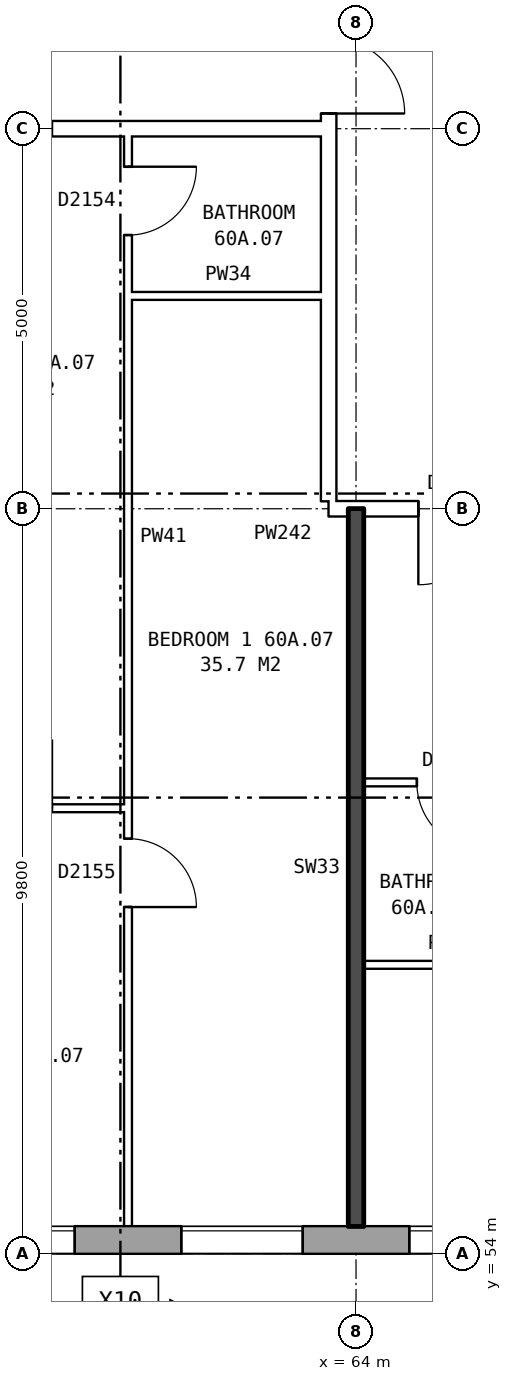
"""IFC4 building model, lengths in metres.
Left out: names, types, materials, properties, quantities, classifications, styles, units other than length and angle.
Written with IfcOpenShell. Run it as: python <this file> out.ifc"""

import sys

from ifc_helpers import new_model, si_unit, direction, frame, frame_2d, origin, place, context, subcontext, project, spatial, rectangle, extrude, element, fill, save


model = new_model("IFC4")
c1 = context("Model", 3, precision=1e-05, world=origin(), true_north=direction((0.0, 1.0)))
c2 = subcontext(c1, "Body", "Model", "MODEL_VIEW")
j1 = project(units=[si_unit("LENGTHUNIT", "METRE"), si_unit("PLANEANGLEUNIT", "RADIAN")], contexts=[c1])
p1 = place(None, origin())
s1 = spatial("IfcSite", under=j1, at=p1, CompositionType="ELEMENT")
p2 = place(p1, origin())
s2 = spatial("IfcBuilding", under=s1, at=p2, CompositionType="ELEMENT")
p3 = place(p2, frame((0.0, 0.0, 212.1)))
s3 = spatial("IfcBuildingStorey", under=s2, at=p3, CompositionType="ELEMENT", Elevation=212.1)
p4 = place(p3, frame((35.075, 54.18, 0.0), z_axis=(0.0, 0.0, 1.0), x_axis=(1.0, 0.0, 0.0)))
e1 = element("IfcWall", 1, at=p4, inside=s3, PredefinedType="STANDARD", context=c2, shape_type="SweptSolid", body=[
    extrude(rectangle(XDim=39.875, YDim=0.36, at=frame_2d((19.938, 0.0))), origin(), (0.0, 0.0, 1.0), 2.85),
])
p5 = place(p4, frame((0.3, 0.0, 0.8)))
e2 = element("IfcOpeningElement", 2, at=p5, cuts=e1, PredefinedType="OPENING", context=c2, shape_type="SweptSolid", body=[
    extrude(rectangle(XDim=0.8, YDim=1.5, at=frame_2d((0.4, 0.75))), frame((0.0, 0.19, 0.0), z_axis=(0.0, -1.0, 0.0), x_axis=(1.0, 0.0, 0.0)), (0.0, 0.0, 1.0), 0.38),
])
p6 = place(p4, frame((5.625, 0.0, 0.8)))
e3 = element("IfcOpeningElement", 3, at=p6, cuts=e1, PredefinedType="OPENING", context=c2, shape_type="SweptSolid", body=[
    extrude(rectangle(XDim=1.6, YDim=1.8, at=frame_2d((0.8, 0.9))), frame((0.0, 0.19, 0.0), z_axis=(0.0, -1.0, 0.0), x_axis=(1.0, 0.0, 0.0)), (0.0, 0.0, 1.0), 0.38),
])
p7 = place(p4, frame((8.625, 0.0, 0.8)))
e4 = element("IfcOpeningElement", 4, at=p7, cuts=e1, PredefinedType="OPENING", context=c2, shape_type="SweptSolid", body=[
    extrude(rectangle(XDim=1.6, YDim=1.8, at=frame_2d((0.8, 0.9))), frame((0.0, 0.19, 0.0), z_axis=(0.0, -1.0, 0.0), x_axis=(1.0, 0.0, 0.0)), (0.0, 0.0, 1.0), 0.38),
])
p8 = place(p4, frame((11.625, 0.0, 0.8)))
e5 = element("IfcOpeningElement", 5, at=p8, cuts=e1, PredefinedType="OPENING", context=c2, shape_type="SweptSolid", body=[
    extrude(rectangle(XDim=1.6, YDim=1.8, at=frame_2d((0.8, 0.9))), frame((0.0, 0.19, 0.0), z_axis=(0.0, -1.0, 0.0), x_axis=(1.0, 0.0, 0.0)), (0.0, 0.0, 1.0), 0.38),
])
p9 = place(p4, frame((14.625, 0.0, 0.8)))
e6 = element("IfcOpeningElement", 6, at=p9, cuts=e1, PredefinedType="OPENING", context=c2, shape_type="SweptSolid", body=[
    extrude(rectangle(XDim=1.6, YDim=1.8, at=frame_2d((0.8, 0.9))), frame((0.0, 0.19, 0.0), z_axis=(0.0, -1.0, 0.0), x_axis=(1.0, 0.0, 0.0)), (0.0, 0.0, 1.0), 0.38),
])
p10 = place(p4, frame((17.625, 0.0, 0.8)))
e7 = element("IfcOpeningElement", 7, at=p10, cuts=e1, PredefinedType="OPENING", context=c2, shape_type="SweptSolid", body=[
    extrude(rectangle(XDim=1.6, YDim=1.8, at=frame_2d((0.8, 0.9))), frame((0.0, 0.19, 0.0), z_axis=(0.0, -1.0, 0.0), x_axis=(1.0, 0.0, 0.0)), (0.0, 0.0, 1.0), 0.38),
])
p11 = place(p4, frame((20.625, 0.0, 0.8)))
e8 = element("IfcOpeningElement", 8, at=p11, cuts=e1, PredefinedType="OPENING", context=c2, shape_type="SweptSolid", body=[
    extrude(rectangle(XDim=1.6, YDim=1.8, at=frame_2d((0.8, 0.9))), frame((0.0, 0.19, 0.0), z_axis=(0.0, -1.0, 0.0), x_axis=(1.0, 0.0, 0.0)), (0.0, 0.0, 1.0), 0.38),
])
p12 = place(p4, frame((23.625, 0.0, 0.8)))
e9 = element("IfcOpeningElement", 9, at=p12, cuts=e1, PredefinedType="OPENING", context=c2, shape_type="SweptSolid", body=[
    extrude(rectangle(XDim=1.6, YDim=1.8, at=frame_2d((0.8, 0.9))), frame((0.0, 0.19, 0.0), z_axis=(0.0, -1.0, 0.0), x_axis=(1.0, 0.0, 0.0)), (0.0, 0.0, 1.0), 0.38),
])
p13 = place(p4, frame((26.625, 0.0, 0.8)))
e10 = element("IfcOpeningElement", 10, at=p13, cuts=e1, PredefinedType="OPENING", context=c2, shape_type="SweptSolid", body=[
    extrude(rectangle(XDim=1.6, YDim=1.8, at=frame_2d((0.8, 0.9))), frame((0.0, 0.19, 0.0), z_axis=(0.0, -1.0, 0.0), x_axis=(1.0, 0.0, 0.0)), (0.0, 0.0, 1.0), 0.38),
])
p14 = place(p4, frame((29.625, 0.0, 0.8)))
e11 = element("IfcOpeningElement", 11, at=p14, cuts=e1, PredefinedType="OPENING", context=c2, shape_type="SweptSolid", body=[
    extrude(rectangle(XDim=1.6, YDim=1.8, at=frame_2d((0.8, 0.9))), frame((0.0, 0.19, 0.0), z_axis=(0.0, -1.0, 0.0), x_axis=(1.0, 0.0, 0.0)), (0.0, 0.0, 1.0), 0.38),
])
p15 = place(p4, frame((31.525, 0.0, 0.8)))
e12 = element("IfcOpeningElement", 12, at=p15, cuts=e1, PredefinedType="OPENING", context=c2, shape_type="SweptSolid", body=[
    extrude(rectangle(XDim=0.8, YDim=1.5, at=frame_2d((0.4, 0.75))), frame((0.0, 0.19, 0.0), z_axis=(0.0, -1.0, 0.0), x_axis=(1.0, 0.0, 0.0)), (0.0, 0.0, 1.0), 0.38),
])
p16 = place(p4, frame((35.625, 0.0, 0.8)))
e13 = element("IfcOpeningElement", 13, at=p16, cuts=e1, PredefinedType="OPENING", context=c2, shape_type="SweptSolid", body=[
    extrude(rectangle(XDim=1.6, YDim=1.8, at=frame_2d((0.8, 0.9))), frame((0.0, 0.19, 0.0), z_axis=(0.0, -1.0, 0.0), x_axis=(1.0, 0.0, 0.0)), (0.0, 0.0, 1.0), 0.38),
])
p17 = place(p4, frame((1.4, 0.0, 0.8)))
e14 = element("IfcOpeningElement", 14, at=p17, cuts=e1, PredefinedType="OPENING", context=c2, shape_type="SweptSolid", body=[
    extrude(rectangle(XDim=1.4, YDim=1.8, at=frame_2d((0.7, 0.9))), frame((0.0, 0.19, 0.0), z_axis=(0.0, -1.0, 0.0), x_axis=(1.0, 0.0, 0.0)), (0.0, 0.0, 1.0), 0.38),
])
p18 = place(p4, frame((33.975, 0.0, 1.7)))
e15 = element("IfcOpeningElement", 15, at=p18, cuts=e1, PredefinedType="OPENING", context=c2, shape_type="SweptSolid", body=[
    extrude(rectangle(XDim=0.6, YDim=0.9, at=frame_2d((0.3, 0.45))), frame((0.0, 0.19, 0.0), z_axis=(0.0, -1.0, 0.0), x_axis=(1.0, 0.0, 0.0)), (0.0, 0.0, 1.0), 0.38),
])
p19 = place(p3, frame((63.64, 63.9, 0.0), z_axis=(0.0, 0.0, 1.0), x_axis=(0.0, 1.0, 0.0)))
e16 = element("IfcWall", 16, at=p19, inside=s3, PredefinedType="PARTITIONING", context=c2, shape_type="SweptSolid", body=[
    extrude(rectangle(XDim=12.2, YDim=0.2, at=frame_2d((6.1, 0.0))), origin(), (0.0, 0.0, 1.0), 2.85),
])
p20 = place(p19, frame((5.1, 0.0, 0.0)))
e17 = element("IfcOpeningElement", 17, at=p20, cuts=e16, PredefinedType="OPENING", context=c2, shape_type="SweptSolid", body=[
    extrude(rectangle(XDim=2.0, YDim=2.1, at=frame_2d((1.0, 1.05))), frame((0.0, 0.11, 0.0), z_axis=(0.0, -1.0, 0.0), x_axis=(1.0, 0.0, 0.0)), (0.0, 0.0, 1.0), 0.22),
])
p21 = place(p3, frame((64.1, 57.8, 0.0), z_axis=(0.0, 0.0, 1.0), x_axis=(1.0, 0.0, 0.0)))
e18 = element("IfcWall", 18, at=p21, inside=s3, PredefinedType="PARTITIONING", context=c2, shape_type="SweptSolid", body=[
    extrude(rectangle(XDim=2.3, YDim=0.1, at=frame_2d((1.15, 0.0))), origin(), (0.0, 0.0, 1.0), 2.85),
])
p22 = place(p3, frame((58.1, 59.86, 0.0), z_axis=(0.0, 0.0, 1.0), x_axis=(1.0, 0.0, 0.0)))
e19 = element("IfcWall", 19, at=p22, inside=s3, PredefinedType="PARTITIONING", context=c2, shape_type="SweptSolid", body=[
    extrude(rectangle(XDim=2.9, YDim=0.1, at=frame_2d((1.45, 0.0))), origin(), (0.0, 0.0, 1.0), 2.85),
])
p23 = place(p22, frame((1.0, 0.0, 0.0)))
e20 = element("IfcOpeningElement", 20, at=p23, cuts=e19, PredefinedType="OPENING", context=c2, shape_type="SweptSolid", body=[
    extrude(rectangle(XDim=0.9, YDim=2.1, at=frame_2d((0.45, 1.05))), frame((0.0, 0.06, 0.0), z_axis=(0.0, -1.0, 0.0), x_axis=(1.0, 0.0, 0.0)), (0.0, 0.0, 1.0), 0.12),
])
p24 = place(p3, frame((64.1, 60.2, 0.0), z_axis=(0.0, 0.0, 1.0), x_axis=(1.0, 0.0, 0.0)))
e21 = element("IfcWall", 21, at=p24, inside=s3, PredefinedType="PARTITIONING", context=c2, shape_type="SweptSolid", body=[
    extrude(rectangle(XDim=5.8, YDim=0.1, at=frame_2d((2.9, 0.0))), origin(), (0.0, 0.0, 1.0), 2.85),
])
p25 = place(p24, frame((3.6, 0.0, 0.0)))
e22 = element("IfcOpeningElement", 22, at=p25, cuts=e21, PredefinedType="OPENING", context=c2, shape_type="SweptSolid", body=[
    extrude(rectangle(XDim=0.9, YDim=2.1, at=frame_2d((0.45, 1.05))), frame((0.0, 0.06, 0.0), z_axis=(0.0, -1.0, 0.0), x_axis=(1.0, 0.0, 0.0)), (0.0, 0.0, 1.0), 0.12),
])
p26 = place(p24, frame((0.7, 0.0, 0.0)))
e23 = element("IfcOpeningElement", 23, at=p26, cuts=e21, PredefinedType="OPENING", context=c2, shape_type="SweptSolid", body=[
    extrude(rectangle(XDim=0.9, YDim=2.1, at=frame_2d((0.45, 1.05))), frame((0.0, 0.06, 0.0), z_axis=(0.0, -1.0, 0.0), x_axis=(1.0, 0.0, 0.0)), (0.0, 0.0, 1.0), 0.12),
])
p27 = place(p3, frame((63.64, 63.8, 0.0), z_axis=(0.0, 0.0, 1.0), x_axis=(1.0, 0.0, 0.0)))
e24 = element("IfcWall", 24, at=p27, inside=s3, PredefinedType="PARTITIONING", context=c2, shape_type="SweptSolid", body=[
    extrude(rectangle(XDim=3.0, YDim=0.2, at=frame_2d((1.5, 0.0))), origin(), (0.0, 0.0, 1.0), 2.85),
])
p28 = place(p27, frame((1.18, 0.0, 0.0)))
e25 = element("IfcOpeningElement", 25, at=p28, cuts=e24, PredefinedType="OPENING", context=c2, shape_type="SweptSolid", body=[
    extrude(rectangle(XDim=1.0, YDim=2.1, at=frame_2d((0.5, 1.05))), frame((0.0, 0.11, 0.0), z_axis=(0.0, -1.0, 0.0), x_axis=(1.0, 0.0, 0.0)), (0.0, 0.0, 1.0), 0.22),
])
p29 = place(p3, frame((61.0, 66.6, 0.0), z_axis=(0.0, 0.0, 1.0), x_axis=(1.0, 0.0, 0.0)))
e26 = element("IfcWall", 26, at=p29, inside=s3, PredefinedType="PARTITIONING", context=c2, shape_type="SweptSolid", body=[
    extrude(rectangle(XDim=2.64, YDim=0.1, at=frame_2d((1.32, 0.0))), origin(), (0.0, 0.0, 1.0), 2.85),
])
p30 = place(p3, frame((44.36, 68.8, 0.0), z_axis=(0.0, 0.0, 1.0), x_axis=(1.0, 0.0, 0.0)))
e27 = element("IfcWall", 27, at=p30, inside=s3, PredefinedType="PARTITIONING", context=c2, shape_type="SweptSolid", body=[
    extrude(rectangle(XDim=19.28, YDim=0.2, at=frame_2d((9.64, 0.0))), origin(), (0.0, 0.0, 1.0), 2.85),
])
p31 = place(p30, frame((14.64, 0.0, 0.0)))
e28 = element("IfcOpeningElement", 28, at=p31, cuts=e27, PredefinedType="OPENING", context=c2, shape_type="SweptSolid", body=[
    extrude(rectangle(XDim=1.0, YDim=2.1, at=frame_2d((0.5, 1.05))), frame((0.0, 0.11, 0.0), z_axis=(0.0, -1.0, 0.0), x_axis=(1.0, 0.0, 0.0)), (0.0, 0.0, 1.0), 0.22),
])
p32 = place(p30, frame((5.64, 0.0, 0.0)))
e29 = element("IfcOpeningElement", 29, at=p32, cuts=e27, PredefinedType="OPENING", context=c2, shape_type="SweptSolid", body=[
    extrude(rectangle(XDim=1.0, YDim=2.1, at=frame_2d((0.5, 1.05))), frame((0.0, 0.11, 0.0), z_axis=(0.0, -1.0, 0.0), x_axis=(1.0, 0.0, 0.0)), (0.0, 0.0, 1.0), 0.22),
])
p33 = place(p3, frame((61.0, 54.36, 0.0), z_axis=(0.0, 0.0, 1.0), x_axis=(0.0, 1.0, 0.0)))
e30 = element("IfcWall", 30, at=p33, inside=s3, PredefinedType="PARTITIONING", context=c2, shape_type="SweptSolid", body=[
    extrude(rectangle(XDim=14.34, YDim=0.1, at=frame_2d((7.17, 0.0))), origin(), (0.0, 0.0, 1.0), 2.85),
])
p34 = place(p33, frame((4.2, 0.0, 0.0)))
e31 = element("IfcOpeningElement", 31, at=p34, cuts=e30, PredefinedType="OPENING", context=c2, shape_type="SweptSolid", body=[
    extrude(rectangle(XDim=0.9, YDim=2.1, at=frame_2d((0.45, 1.05))), frame((0.0, 0.06, 0.0), z_axis=(0.0, -1.0, 0.0), x_axis=(1.0, 0.0, 0.0)), (0.0, 0.0, 1.0), 0.12),
])
p35 = place(p33, frame((13.04, 0.0, 0.0)))
e32 = element("IfcOpeningElement", 32, at=p35, cuts=e30, PredefinedType="OPENING", context=c2, shape_type="SweptSolid", body=[
    extrude(rectangle(XDim=0.9, YDim=2.1, at=frame_2d((0.45, 1.05))), frame((0.0, 0.06, 0.0), z_axis=(0.0, -1.0, 0.0), x_axis=(1.0, 0.0, 0.0)), (0.0, 0.0, 1.0), 0.12),
])
p36 = place(p3, frame((64.0, 54.36, 0.0), z_axis=(0.0, 0.0, 1.0), x_axis=(0.0, 1.0, 0.0)))
e33 = element("IfcWall", 33, at=p36, inside=s3, PredefinedType="SOLIDWALL", context=c2, shape_type="SweptSolid", body=[
    extrude(rectangle(XDim=9.44, YDim=0.2, at=frame_2d((4.72, 0.0))), origin(), (0.0, 0.0, 1.0), 2.85),
])
p37 = place(p12, origin())
e34 = element("IfcWindow", 34, at=p37, inside=s3, PartitioningType="SINGLE_PANEL", PredefinedType="WINDOW", context=c2, shape_type="SweptSolid", body=[
    extrude(rectangle(XDim=1.6, YDim=1.8, at=frame_2d((0.8, 0.9))), frame((0.0, 0.15, 0.0), z_axis=(0.0, -1.0, 0.0), x_axis=(1.0, 0.0, 0.0)), (0.0, 0.0, 1.0), 0.06),
])
fill(e9, e34)
p38 = place(p13, origin())
e35 = element("IfcWindow", 35, at=p38, inside=s3, PartitioningType="SINGLE_PANEL", PredefinedType="WINDOW", context=c2, shape_type="SweptSolid", body=[
    extrude(rectangle(XDim=1.6, YDim=1.8, at=frame_2d((0.8, 0.9))), frame((0.0, 0.15, 0.0), z_axis=(0.0, -1.0, 0.0), x_axis=(1.0, 0.0, 0.0)), (0.0, 0.0, 1.0), 0.06),
])
fill(e10, e35)
p39 = place(p14, origin())
e36 = element("IfcWindow", 36, at=p39, inside=s3, PartitioningType="SINGLE_PANEL", PredefinedType="WINDOW", context=c2, shape_type="SweptSolid", body=[
    extrude(rectangle(XDim=1.6, YDim=1.8, at=frame_2d((0.8, 0.9))), frame((0.0, 0.15, 0.0), z_axis=(0.0, -1.0, 0.0), x_axis=(1.0, 0.0, 0.0)), (0.0, 0.0, 1.0), 0.06),
])
fill(e11, e36)
p40 = place(p20, frame((2.0, 0.0, 0.0), z_axis=(0.0, 0.0, 1.0), x_axis=(-1.0, 0.0, 0.0)))
e37 = element("IfcDoor", 37, at=p40, inside=s3, OperationType="DOUBLE_DOOR_SINGLE_SWING", PredefinedType="DOOR", context=c2, shape_type="SweptSolid", body=[
    extrude(rectangle(XDim=2.0, YDim=2.1, at=frame_2d((1.0, 1.05))), frame((0.0, 0.025, 0.0), z_axis=(0.0, -1.0, 0.0), x_axis=(1.0, 0.0, 0.0)), (0.0, 0.0, 1.0), 0.05),
])
fill(e17, e37)
p41 = place(p28, frame((1.0, 0.0, 0.0), z_axis=(0.0, 0.0, 1.0), x_axis=(-1.0, 0.0, 0.0)))
e38 = element("IfcDoor", 38, at=p41, inside=s3, OperationType="SINGLE_SWING_RIGHT", PredefinedType="DOOR", context=c2, shape_type="SweptSolid", body=[
    extrude(rectangle(XDim=1.0, YDim=2.1, at=frame_2d((0.5, 1.05))), frame((0.0, 0.025, 0.0), z_axis=(0.0, -1.0, 0.0), x_axis=(1.0, 0.0, 0.0)), (0.0, 0.0, 1.0), 0.05),
])
fill(e25, e38)
p42 = place(p26, frame((0.9, 0.0, 0.0), z_axis=(0.0, 0.0, 1.0), x_axis=(-1.0, 0.0, 0.0)))
e39 = element("IfcDoor", 39, at=p42, inside=s3, OperationType="SINGLE_SWING_LEFT", PredefinedType="DOOR", context=c2, shape_type="SweptSolid", body=[
    extrude(rectangle(XDim=0.9, YDim=2.1, at=frame_2d((0.45, 1.05))), frame((0.0, 0.025, 0.0), z_axis=(0.0, -1.0, 0.0), x_axis=(1.0, 0.0, 0.0)), (0.0, 0.0, 1.0), 0.05),
])
fill(e23, e39)
p43 = place(p34, frame((0.9, 0.0, 0.0), z_axis=(0.0, 0.0, 1.0), x_axis=(-1.0, 0.0, 0.0)))
e40 = element("IfcDoor", 40, at=p43, inside=s3, OperationType="SINGLE_SWING_RIGHT", PredefinedType="DOOR", context=c2, shape_type="SweptSolid", body=[
    extrude(rectangle(XDim=0.9, YDim=2.1, at=frame_2d((0.45, 1.05))), frame((0.0, 0.025, 0.0), z_axis=(0.0, -1.0, 0.0), x_axis=(1.0, 0.0, 0.0)), (0.0, 0.0, 1.0), 0.05),
])
fill(e31, e40)
p44 = place(p35, frame((0.9, 0.0, 0.0), z_axis=(0.0, 0.0, 1.0), x_axis=(-1.0, 0.0, 0.0)))
e41 = element("IfcDoor", 41, at=p44, inside=s3, OperationType="SINGLE_SWING_LEFT", PredefinedType="DOOR", context=c2, shape_type="SweptSolid", body=[
    extrude(rectangle(XDim=0.9, YDim=2.1, at=frame_2d((0.45, 1.05))), frame((0.0, 0.025, 0.0), z_axis=(0.0, -1.0, 0.0), x_axis=(1.0, 0.0, 0.0)), (0.0, 0.0, 1.0), 0.05),
])
fill(e32, e41)
save(model, sys.argv[1])
